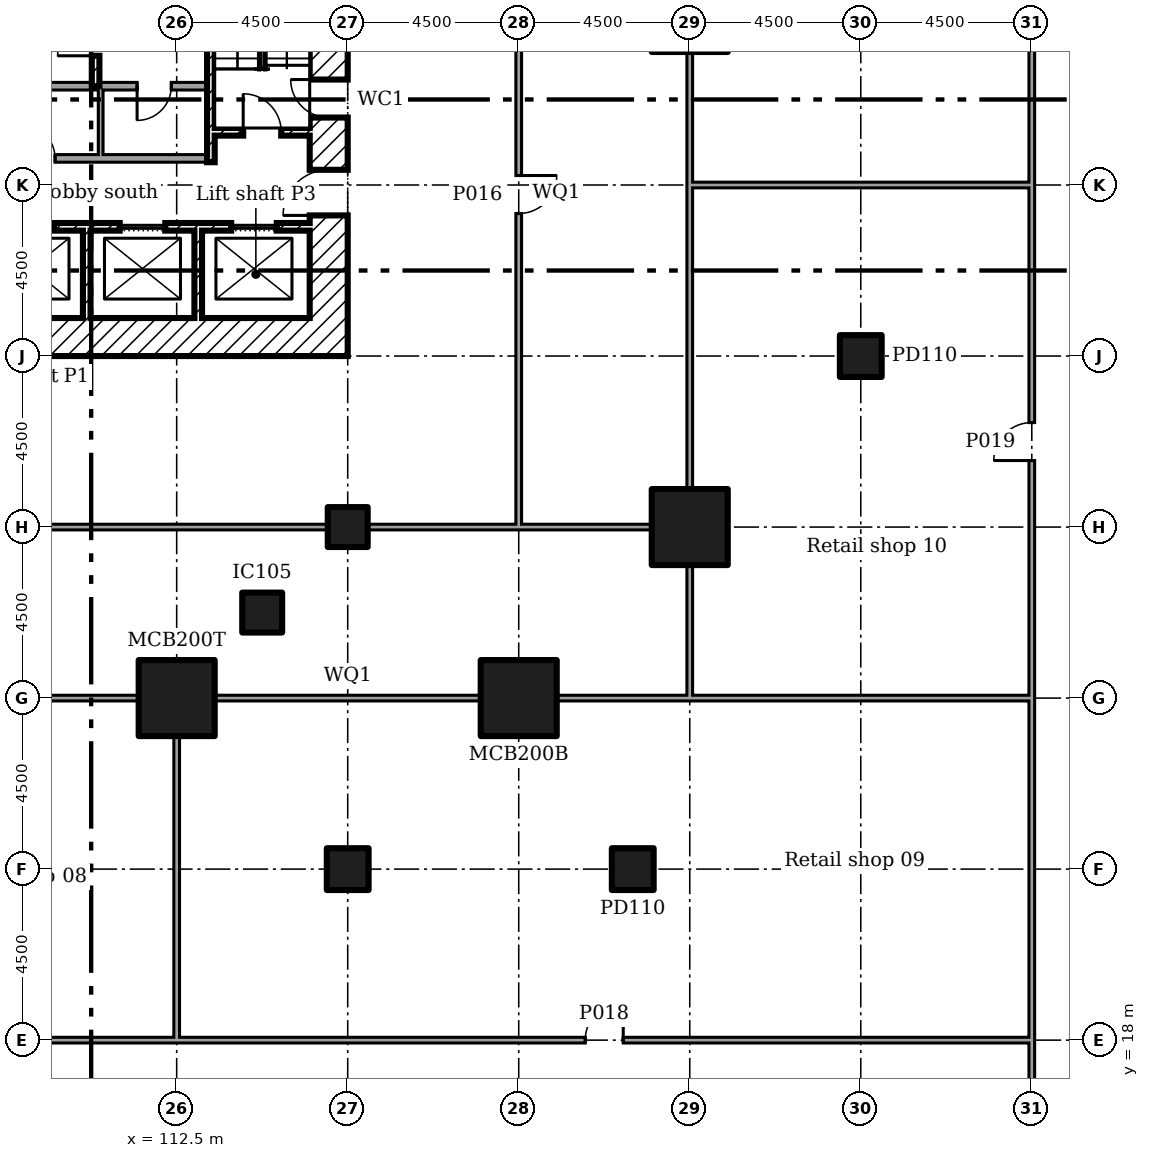
"""IFC4 building model, lengths in metres.
Left out: names, types, materials, properties, quantities, classifications, styles, units other than length and angle.
Written with IfcOpenShell. Run it as: python <this file> out.ifc"""

import sys

from ifc_helpers import new_model, si_unit, direction, frame, frame_2d, origin, origin_2d, place, context, subcontext, project, spatial, rectangle, extrude, element, fill, save


model = new_model("IFC4")
c1 = context("Model", 3, precision=1e-05, world=origin(), true_north=direction((0.0, 1.0)))
c2 = subcontext(c1, "Body", "Model", "MODEL_VIEW")
j1 = project(units=[si_unit("LENGTHUNIT", "METRE"), si_unit("PLANEANGLEUNIT", "RADIAN")], contexts=[c1])
p1 = place(None, origin())
s1 = spatial("IfcSite", under=j1, at=p1, CompositionType="ELEMENT")
p2 = place(p1, origin())
s2 = spatial("IfcBuilding", under=s1, at=p2, CompositionType="ELEMENT")
p3 = place(p2, frame((0.0, 0.0, 6.0)))
s3 = spatial("IfcBuildingStorey", under=s2, at=p3, CompositionType="ELEMENT", Elevation=6.0)
for number, where in (
    (1, (112.5, 27.0, 0.0)),
    (2, (121.5, 27.0, 0.0)),
    (3, (126.0, 31.5, 0.0)),
):
    element("IfcColumn", number, at=place(p3, frame(where)), inside=s3, PredefinedType="COLUMN", context=c2, shape_type="SweptSolid", body=[
        extrude(rectangle(XDim=2.0, YDim=2.0, at=origin_2d()), origin(), (0.0, 0.0, 1.0), 5.5),
    ])
for number, where in (
    (4, (114.75, 29.25, 0.0)),
    (5, (117.0, 31.5, 0.0)),
):
    element("IfcColumn", number, at=place(p3, frame(where)), inside=s3, PredefinedType="COLUMN", context=c2, shape_type="SweptSolid", body=[
        extrude(rectangle(XDim=1.05, YDim=1.05, at=origin_2d()), origin(), (0.0, 0.0, 1.0), 5.5),
    ])
for number, where in (
    (6, (117.0, 22.5, 0.0)),
    (7, (124.5, 22.5, 0.0)),
    (8, (130.5, 36.0, 0.0)),
):
    element("IfcColumn", number, at=place(p3, frame(where)), inside=s3, PredefinedType="COLUMN", context=c2, shape_type="SweptSolid", body=[
        extrude(rectangle(XDim=1.1, YDim=1.1, at=origin_2d()), origin(), (0.0, 0.0, 1.0), 5.5),
    ])
p4 = place(p3, frame((116.5, 36.0, 0.0), z_axis=(0.0, 0.0, 1.0), x_axis=(0.0, 1.0, 0.0)))
e9 = element("IfcWall", 9, at=p4, inside=s3, PredefinedType="SHEAR", context=c2, shape_type="SweptSolid", body=[
    extrude(rectangle(XDim=13.5, YDim=1.0, at=frame_2d((6.75, 0.0))), origin(), (0.0, 0.0, 1.0), 5.0),
])
p5 = place(p4, frame((3.7, 0.0, 0.0)))
e10 = element("IfcOpeningElement", 10, at=p5, cuts=e9, PredefinedType="OPENING", context=c2, shape_type="SweptSolid", body=[
    extrude(rectangle(XDim=1.2, YDim=2.1, at=frame_2d((0.6, 1.05))), frame((0.0, 0.51, 0.0), z_axis=(0.0, -1.0, 0.0), x_axis=(1.0, 0.0, 0.0)), (0.0, 0.0, 1.0), 1.02),
])
p6 = place(p4, frame((6.275, 0.0, 0.0)))
e11 = element("IfcOpeningElement", 11, at=p6, cuts=e9, PredefinedType="OPENING", context=c2, shape_type="SweptSolid", body=[
    extrude(rectangle(XDim=1.0, YDim=2.1, at=frame_2d((0.5, 1.05))), frame((0.0, 0.51, 0.0), z_axis=(0.0, -1.0, 0.0), x_axis=(1.0, 0.0, 0.0)), (0.0, 0.0, 1.0), 1.02),
])
p7 = place(p3, frame((104.5, 36.5, 0.0)))
e12 = element("IfcWall", 12, at=p7, inside=s3, PredefinedType="SHEAR", context=c2, shape_type="SweptSolid", body=[
    extrude(rectangle(XDim=11.5, YDim=1.0, at=frame_2d((5.75, 0.0))), origin(), (0.0, 0.0, 1.0), 5.0),
])
p8 = place(p3, frame((110.367, 48.5, 0.0), z_axis=(0.0, 0.0, 1.0), x_axis=(0.0, -1.0, 0.0)))
e13 = element("IfcWall", 13, at=p8, inside=s3, PredefinedType="SHEAR", context=c2, shape_type="SweptSolid", body=[
    extrude(rectangle(XDim=5.4, YDim=0.2, at=frame_2d((2.7, 0.0))), origin(), (0.0, 0.0, 1.0), 5.0),
])
p9 = place(p8, frame((3.6, 0.0, 0.0)))
e14 = element("IfcOpeningElement", 14, at=p9, cuts=e13, PredefinedType="OPENING", context=c2, shape_type="SweptSolid", body=[
    extrude(rectangle(XDim=1.0, YDim=2.1, at=frame_2d((0.5, 1.05))), frame((0.0, 0.11, 0.0), z_axis=(0.0, -1.0, 0.0), x_axis=(1.0, 0.0, 0.0)), (0.0, 0.0, 1.0), 0.22),
])
for number, where, z_axis, x_axis in (
    (15, (110.133, 37.0, 0.0), (0.0, 0.0, 1.0), (0.0, 1.0, 0.0)),
    (16, (113.067, 37.0, 0.0), (0.0, 0.0, 1.0), (0.0, 1.0, 0.0)),
):
    element("IfcWall", number, at=place(p3, frame(where, z_axis=z_axis, x_axis=x_axis)), inside=s3, PredefinedType="SHEAR", context=c2, shape_type="SweptSolid", body=[
        extrude(rectangle(XDim=2.3, YDim=0.2, at=frame_2d((1.15, 0.0))), origin(), (0.0, 0.0, 1.0), 5.0),
    ])
p10 = place(p3, frame((107.2, 39.4, 0.0)))
e17 = element("IfcWall", 17, at=p10, inside=s3, PredefinedType="SHEAR", context=c2, shape_type="SweptSolid", body=[
    extrude(rectangle(XDim=8.8, YDim=0.2, at=frame_2d((4.4, 0.0))), origin(), (0.0, 0.0, 1.0), 5.0),
])
p11 = place(p10, frame((0.867, 0.0, 0.0)))
e18 = element("IfcOpeningElement", 18, at=p11, cuts=e17, PredefinedType="OPENING", context=c2, shape_type="SweptSolid", body=[
    extrude(rectangle(XDim=1.2, YDim=2.1, at=frame_2d((0.6, 1.05))), frame((0.0, 0.11, 0.0), z_axis=(0.0, -1.0, 0.0), x_axis=(1.0, 0.0, 0.0)), (0.0, 0.0, 1.0), 0.22),
])
p12 = place(p10, frame((3.8, 0.0, 0.0)))
e19 = element("IfcOpeningElement", 19, at=p12, cuts=e17, PredefinedType="OPENING", context=c2, shape_type="SweptSolid", body=[
    extrude(rectangle(XDim=1.2, YDim=2.1, at=frame_2d((0.6, 1.05))), frame((0.0, 0.11, 0.0), z_axis=(0.0, -1.0, 0.0), x_axis=(1.0, 0.0, 0.0)), (0.0, 0.0, 1.0), 0.22),
])
p13 = place(p10, frame((6.733, 0.0, 0.0)))
e20 = element("IfcOpeningElement", 20, at=p13, cuts=e17, PredefinedType="OPENING", context=c2, shape_type="SweptSolid", body=[
    extrude(rectangle(XDim=1.2, YDim=2.1, at=frame_2d((0.6, 1.05))), frame((0.0, 0.11, 0.0), z_axis=(0.0, -1.0, 0.0), x_axis=(1.0, 0.0, 0.0)), (0.0, 0.0, 1.0), 0.22),
])
p14 = place(p3, frame((113.5, 41.9, 0.0)))
e21 = element("IfcWall", 21, at=p14, inside=s3, PredefinedType="SHEAR", context=c2, shape_type="SweptSolid", body=[
    extrude(rectangle(XDim=2.5, YDim=0.2, at=frame_2d((1.25, 0.0))), origin(), (0.0, 0.0, 1.0), 5.0),
])
p15 = place(p14, frame((0.75, 0.0, 0.0)))
e22 = element("IfcOpeningElement", 22, at=p15, cuts=e21, PredefinedType="OPENING", context=c2, shape_type="SweptSolid", body=[
    extrude(rectangle(XDim=1.0, YDim=2.1, at=frame_2d((0.5, 1.05))), frame((0.0, 0.11, 0.0), z_axis=(0.0, -1.0, 0.0), x_axis=(1.0, 0.0, 0.0)), (0.0, 0.0, 1.0), 0.22),
])
p16 = place(p3, frame((113.4, 41.1, 0.0), z_axis=(0.0, 0.0, 1.0), x_axis=(0.0, 1.0, 0.0)))
e23 = element("IfcWall", 23, at=p16, inside=s3, PredefinedType="SHEAR", context=c2, shape_type="SweptSolid", body=[
    extrude(rectangle(XDim=7.4, YDim=0.2, at=frame_2d((3.7, 0.0))), origin(), (0.0, 0.0, 1.0), 5.0),
])
p17 = place(p3, frame((107.2, 43.1, 0.0)))
e24 = element("IfcWall", 24, at=p17, inside=s3, PredefinedType="PARTITIONING", context=c2, shape_type="SweptSolid", body=[
    extrude(rectangle(XDim=6.1, YDim=0.2, at=frame_2d((3.05, 0.0))), origin(), (0.0, 0.0, 1.0), 5.0),
])
p18 = place(p17, frame((4.259, 0.0, 0.0)))
e25 = element("IfcOpeningElement", 25, at=p18, cuts=e24, PredefinedType="OPENING", context=c2, shape_type="SweptSolid", body=[
    extrude(rectangle(XDim=0.9, YDim=2.1, at=frame_2d((0.45, 1.05))), frame((0.0, 0.11, 0.0), z_axis=(0.0, -1.0, 0.0), x_axis=(1.0, 0.0, 0.0)), (0.0, 0.0, 1.0), 0.22),
])
p19 = place(p3, frame((107.2, 41.2, 0.0)))
e26 = element("IfcWall", 26, at=p19, inside=s3, PredefinedType="PARTITIONING", context=c2, shape_type="SweptSolid", body=[
    extrude(rectangle(XDim=6.1, YDim=0.2, at=frame_2d((3.05, 0.0))), origin(), (0.0, 0.0, 1.0), 5.0),
])
p20 = place(p19, frame((1.2, 0.0, 0.0)))
e27 = element("IfcOpeningElement", 27, at=p20, cuts=e26, PredefinedType="OPENING", context=c2, shape_type="SweptSolid", body=[
    extrude(rectangle(XDim=0.9, YDim=2.1, at=frame_2d((0.45, 1.05))), frame((0.0, 0.11, 0.0), z_axis=(0.0, -1.0, 0.0), x_axis=(1.0, 0.0, 0.0)), (0.0, 0.0, 1.0), 0.22),
])
p21 = place(p3, frame((110.5, 41.3, 0.0), z_axis=(0.0, 0.0, 1.0), x_axis=(0.0, 1.0, 0.0)))
e28 = element("IfcWall", 28, at=p21, inside=s3, PredefinedType="PARTITIONING", context=c2, shape_type="SweptSolid", body=[
    extrude(rectangle(XDim=1.7, YDim=0.125, at=frame_2d((0.85, 0.0))), origin(), (0.0, 0.0, 1.0), 5.0),
])
p22 = place(p3, frame((135.0, 9.3, 0.0), z_axis=(0.0, 0.0, 1.0), x_axis=(0.0, 1.0, 0.0)))
e29 = element("IfcWall", 29, at=p22, inside=s3, PredefinedType="PARTITIONING", context=c2, shape_type="SweptSolid", body=[
    extrude(rectangle(XDim=8.775, YDim=0.15, at=frame_2d((4.387, 0.0))), origin(), (0.0, 0.0, 1.0), 5.05),
])
p23 = place(p22, frame((3.45, 0.0, 0.0)))
e30 = element("IfcOpeningElement", 30, at=p23, cuts=e29, PredefinedType="OPENING", context=c2, shape_type="SweptSolid", body=[
    extrude(rectangle(XDim=1.8, YDim=2.1, at=frame_2d((0.9, 1.05))), frame((0.0, 0.085, 0.0), z_axis=(0.0, -1.0, 0.0), x_axis=(1.0, 0.0, 0.0)), (0.0, 0.0, 1.0), 0.17),
])
p24 = place(p3, frame((94.575, 18.0, 0.0)))
e31 = element("IfcWall", 31, at=p24, inside=s3, PredefinedType="PARTITIONING", context=c2, shape_type="SweptSolid", body=[
    extrude(rectangle(XDim=18.0, YDim=0.15, at=frame_2d((9.0, 0.0))), origin(), (0.0, 0.0, 1.0), 5.05),
])
p25 = place(p24, frame((8.425, 0.0, 0.0)))
e32 = element("IfcOpeningElement", 32, at=p25, cuts=e31, PredefinedType="OPENING", context=c2, shape_type="SweptSolid", body=[
    extrude(rectangle(XDim=1.0, YDim=2.1, at=frame_2d((0.5, 1.05))), frame((0.0, 0.085, 0.0), z_axis=(0.0, -1.0, 0.0), x_axis=(1.0, 0.0, 0.0)), (0.0, 0.0, 1.0), 0.17),
])
p26 = place(p3, frame((112.5, 18.0, 0.0)))
e33 = element("IfcWall", 33, at=p26, inside=s3, PredefinedType="PARTITIONING", context=c2, shape_type="SweptSolid", body=[
    extrude(rectangle(XDim=22.425, YDim=0.15, at=frame_2d((11.212, 0.0))), origin(), (0.0, 0.0, 1.0), 5.05),
])
p27 = place(p26, frame((10.75, 0.0, 0.0)))
e34 = element("IfcOpeningElement", 34, at=p27, cuts=e33, PredefinedType="OPENING", context=c2, shape_type="SweptSolid", body=[
    extrude(rectangle(XDim=1.0, YDim=2.1, at=frame_2d((0.5, 1.05))), frame((0.0, 0.085, 0.0), z_axis=(0.0, -1.0, 0.0), x_axis=(1.0, 0.0, 0.0)), (0.0, 0.0, 1.0), 0.17),
])
p28 = place(p3, frame((135.0, 18.0, 0.0), z_axis=(0.0, 0.0, 1.0), x_axis=(0.0, 1.0, 0.0)))
e35 = element("IfcWall", 35, at=p28, inside=s3, PredefinedType="PARTITIONING", context=c2, shape_type="SweptSolid", body=[
    extrude(rectangle(XDim=9.075, YDim=0.15, at=frame_2d((4.538, 0.0))), origin(), (0.0, 0.0, 1.0), 5.05),
])
p29 = place(p3, frame((135.0, 27.0, 0.0), z_axis=(0.0, 0.0, 1.0), x_axis=(0.0, 1.0, 0.0)))
e36 = element("IfcWall", 36, at=p29, inside=s3, PredefinedType="PARTITIONING", context=c2, shape_type="SweptSolid", body=[
    extrude(rectangle(XDim=13.575, YDim=0.15, at=frame_2d((6.788, 0.0))), origin(), (0.0, 0.0, 1.0), 5.05),
])
p30 = place(p29, frame((6.25, 0.0, 0.0)))
e37 = element("IfcOpeningElement", 37, at=p30, cuts=e36, PredefinedType="OPENING", context=c2, shape_type="SweptSolid", body=[
    extrude(rectangle(XDim=1.0, YDim=2.1, at=frame_2d((0.5, 1.05))), frame((0.0, 0.085, 0.0), z_axis=(0.0, -1.0, 0.0), x_axis=(1.0, 0.0, 0.0)), (0.0, 0.0, 1.0), 0.17),
])
p31 = place(p3, frame((135.0, 40.5, 0.0), z_axis=(0.0, 0.0, 1.0), x_axis=(0.0, 1.0, 0.0)))
e38 = element("IfcWall", 38, at=p31, inside=s3, PredefinedType="PARTITIONING", context=c2, shape_type="SweptSolid", body=[
    extrude(rectangle(XDim=18.075, YDim=0.15, at=frame_2d((9.038, 0.0))), origin(), (0.0, 0.0, 1.0), 5.05),
])
p32 = place(p31, frame((7.3, 0.0, 0.0)))
e39 = element("IfcOpeningElement", 39, at=p32, cuts=e38, PredefinedType="OPENING", context=c2, shape_type="SweptSolid", body=[
    extrude(rectangle(XDim=1.0, YDim=2.1, at=frame_2d((0.5, 1.05))), frame((0.0, 0.085, 0.0), z_axis=(0.0, -1.0, 0.0), x_axis=(1.0, 0.0, 0.0)), (0.0, 0.0, 1.0), 0.17),
])
p33 = place(p3, frame((99.075, 31.5, 0.0)))
e40 = element("IfcWall", 40, at=p33, inside=s3, PredefinedType="PARTITIONING", context=c2, shape_type="SweptSolid", body=[
    extrude(rectangle(XDim=17.405, YDim=0.15, at=frame_2d((8.703, 0.0))), origin(), (0.0, 0.0, 1.0), 5.05),
])
p34 = place(p33, frame((8.175, 0.0, 0.0)))
e41 = element("IfcOpeningElement", 41, at=p34, cuts=e40, PredefinedType="OPENING", context=c2, shape_type="SweptSolid", body=[
    extrude(rectangle(XDim=1.0, YDim=2.1, at=frame_2d((0.5, 1.05))), frame((0.0, 0.085, 0.0), z_axis=(0.0, -1.0, 0.0), x_axis=(1.0, 0.0, 0.0)), (0.0, 0.0, 1.0), 0.17),
])
p35 = place(p3, frame((117.52, 31.5, 0.0)))
e42 = element("IfcWall", 42, at=p35, inside=s3, PredefinedType="PARTITIONING", context=c2, shape_type="SweptSolid", body=[
    extrude(rectangle(XDim=4.055, YDim=0.15, at=frame_2d((2.027, 0.0))), origin(), (0.0, 0.0, 1.0), 5.05),
])
p36 = place(p3, frame((121.5, 31.575, 0.0), z_axis=(0.0, 0.0, 1.0), x_axis=(0.0, 1.0, 0.0)))
e43 = element("IfcWall", 43, at=p36, inside=s3, PredefinedType="PARTITIONING", context=c2, shape_type="SweptSolid", body=[
    extrude(rectangle(XDim=17.405, YDim=0.15, at=frame_2d((8.703, 0.0))), origin(), (0.0, 0.0, 1.0), 5.05),
])
p37 = place(p36, frame((8.175, 0.0, 0.0)))
e44 = element("IfcOpeningElement", 44, at=p37, cuts=e43, PredefinedType="OPENING", context=c2, shape_type="SweptSolid", body=[
    extrude(rectangle(XDim=1.0, YDim=2.1, at=frame_2d((0.5, 1.05))), frame((0.0, 0.085, 0.0), z_axis=(0.0, -1.0, 0.0), x_axis=(1.0, 0.0, 0.0)), (0.0, 0.0, 1.0), 0.17),
])
p38 = place(p3, frame((121.5, 31.5, 0.0)))
e45 = element("IfcWall", 45, at=p38, inside=s3, PredefinedType="PARTITIONING", context=c2, shape_type="SweptSolid", body=[
    extrude(rectangle(XDim=3.505, YDim=0.15, at=frame_2d((1.752, 0.0))), origin(), (0.0, 0.0, 1.0), 5.05),
])
p39 = place(p3, frame((99.995, 27.0, 0.0)))
e46 = element("IfcWall", 46, at=p39, inside=s3, PredefinedType="PARTITIONING", context=c2, shape_type="SweptSolid", body=[
    extrude(rectangle(XDim=11.51, YDim=0.15, at=frame_2d((5.755, 0.0))), origin(), (0.0, 0.0, 1.0), 5.05),
])
p40 = place(p3, frame((113.495, 27.0, 0.0)))
e47 = element("IfcWall", 47, at=p40, inside=s3, PredefinedType="PARTITIONING", context=c2, shape_type="SweptSolid", body=[
    extrude(rectangle(XDim=7.01, YDim=0.15, at=frame_2d((3.505, 0.0))), origin(), (0.0, 0.0, 1.0), 5.05),
])
p41 = place(p3, frame((122.495, 27.0, 0.0)))
e48 = element("IfcWall", 48, at=p41, inside=s3, PredefinedType="PARTITIONING", context=c2, shape_type="SweptSolid", body=[
    extrude(rectangle(XDim=3.58, YDim=0.15, at=frame_2d((1.79, 0.0))), origin(), (0.0, 0.0, 1.0), 5.05),
])
p42 = place(p3, frame((126.0, 27.075, 0.0), z_axis=(0.0, 0.0, 1.0), x_axis=(0.0, 1.0, 0.0)))
e49 = element("IfcWall", 49, at=p42, inside=s3, PredefinedType="PARTITIONING", context=c2, shape_type="SweptSolid", body=[
    extrude(rectangle(XDim=3.43, YDim=0.15, at=frame_2d((1.715, 0.0))), origin(), (0.0, 0.0, 1.0), 5.05),
])
p43 = place(p3, frame((126.0, 32.495, 0.0), z_axis=(0.0, 0.0, 1.0), x_axis=(0.0, 1.0, 0.0)))
e50 = element("IfcWall", 50, at=p43, inside=s3, PredefinedType="PARTITIONING", context=c2, shape_type="SweptSolid", body=[
    extrude(rectangle(XDim=8.08, YDim=0.15, at=frame_2d((4.04, 0.0))), origin(), (0.0, 0.0, 1.0), 5.05),
])
p44 = place(p3, frame((126.0, 40.5, 0.0), z_axis=(0.0, 0.0, 1.0), x_axis=(0.0, 1.0, 0.0)))
e51 = element("IfcWall", 51, at=p44, inside=s3, PredefinedType="PARTITIONING", context=c2, shape_type="SweptSolid", body=[
    extrude(rectangle(XDim=3.505, YDim=0.15, at=frame_2d((1.752, 0.0))), origin(), (0.0, 0.0, 1.0), 5.05),
])
p45 = place(p3, frame((112.5, 18.075, 0.0), z_axis=(0.0, 0.0, 1.0), x_axis=(0.0, 1.0, 0.0)))
e52 = element("IfcWall", 52, at=p45, inside=s3, PredefinedType="PARTITIONING", context=c2, shape_type="SweptSolid", body=[
    extrude(rectangle(XDim=7.93, YDim=0.15, at=frame_2d((3.965, 0.0))), origin(), (0.0, 0.0, 1.0), 5.05),
])
p46 = place(p3, frame((126.0, 27.0, 0.0)))
e53 = element("IfcWall", 53, at=p46, inside=s3, PredefinedType="PARTITIONING", context=c2, shape_type="SweptSolid", body=[
    extrude(rectangle(XDim=8.925, YDim=0.15, at=frame_2d((4.462, 0.0))), origin(), (0.0, 0.0, 1.0), 5.05),
])
p47 = place(p3, frame((126.075, 40.5, 0.0)))
e54 = element("IfcWall", 54, at=p47, inside=s3, PredefinedType="PARTITIONING", context=c2, shape_type="SweptSolid", body=[
    extrude(rectangle(XDim=8.85, YDim=0.15, at=frame_2d((4.425, 0.0))), origin(), (0.0, 0.0, 1.0), 5.05),
])
p48 = place(p5, origin())
e55 = element("IfcDoor", 55, at=p48, inside=s3, OperationType="SINGLE_SWING_RIGHT", PredefinedType="DOOR", context=c2, shape_type="SweptSolid", body=[
    extrude(rectangle(XDim=1.2, YDim=2.1, at=frame_2d((0.6, 1.05))), frame((0.0, 0.025, 0.0), z_axis=(0.0, -1.0, 0.0), x_axis=(1.0, 0.0, 0.0)), (0.0, 0.0, 1.0), 0.05),
])
fill(e10, e55)
p49 = place(p15, origin())
e56 = element("IfcDoor", 56, at=p49, inside=s3, OperationType="SINGLE_SWING_RIGHT", PredefinedType="DOOR", context=c2, shape_type="SweptSolid", body=[
    extrude(rectangle(XDim=1.0, YDim=2.1, at=frame_2d((0.5, 1.05))), frame((0.0, 0.025, 0.0), z_axis=(0.0, -1.0, 0.0), x_axis=(1.0, 0.0, 0.0)), (0.0, 0.0, 1.0), 0.05),
])
fill(e22, e56)
p50 = place(p6, origin())
e57 = element("IfcDoor", 57, at=p50, inside=s3, OperationType="SINGLE_SWING_LEFT", PredefinedType="DOOR", context=c2, shape_type="SweptSolid", body=[
    extrude(rectangle(XDim=1.0, YDim=2.1, at=frame_2d((0.5, 1.05))), frame((0.0, 0.025, 0.0), z_axis=(0.0, -1.0, 0.0), x_axis=(1.0, 0.0, 0.0)), (0.0, 0.0, 1.0), 0.05),
])
fill(e11, e57)
p51 = place(p9, frame((1.0, 0.0, 0.0), x_axis=(-1.0, 0.0, 0.0)))
e58 = element("IfcDoor", 58, at=p51, inside=s3, OperationType="SINGLE_SWING_RIGHT", PredefinedType="DOOR", context=c2, shape_type="SweptSolid", body=[
    extrude(rectangle(XDim=1.0, YDim=2.1, at=frame_2d((0.5, 1.05))), frame((0.0, 0.025, 0.0), z_axis=(0.0, -1.0, 0.0), x_axis=(1.0, 0.0, 0.0)), (0.0, 0.0, 1.0), 0.05),
])
fill(e14, e58)
p52 = place(p20, origin())
e59 = element("IfcDoor", 59, at=p52, inside=s3, OperationType="SINGLE_SWING_RIGHT", PredefinedType="DOOR", context=c2, shape_type="SweptSolid", body=[
    extrude(rectangle(XDim=0.9, YDim=2.1, at=frame_2d((0.45, 1.05))), frame((0.0, 0.025, 0.0), z_axis=(0.0, -1.0, 0.0), x_axis=(1.0, 0.0, 0.0)), (0.0, 0.0, 1.0), 0.05),
])
fill(e27, e59)
p53 = place(p18, frame((0.9, 0.0, 0.0), x_axis=(-1.0, 0.0, 0.0)))
e60 = element("IfcDoor", 60, at=p53, inside=s3, OperationType="SINGLE_SWING_LEFT", PredefinedType="DOOR", context=c2, shape_type="SweptSolid", body=[
    extrude(rectangle(XDim=0.9, YDim=2.1, at=frame_2d((0.45, 1.05))), frame((0.0, 0.025, 0.0), z_axis=(0.0, -1.0, 0.0), x_axis=(1.0, 0.0, 0.0)), (0.0, 0.0, 1.0), 0.05),
])
fill(e25, e60)
p54 = place(p11, origin())
e61 = element("IfcDoor", 61, at=p54, inside=s3, OperationType="SLIDING_TO_LEFT", PredefinedType="DOOR", context=c2, shape_type="SweptSolid", body=[
    extrude(rectangle(XDim=1.2, YDim=2.1, at=frame_2d((0.6, 1.05))), frame((0.0, 0.025, 0.0), z_axis=(0.0, -1.0, 0.0), x_axis=(1.0, 0.0, 0.0)), (0.0, 0.0, 1.0), 0.05),
])
fill(e18, e61)
p55 = place(p12, origin())
e62 = element("IfcDoor", 62, at=p55, inside=s3, OperationType="SLIDING_TO_LEFT", PredefinedType="DOOR", context=c2, shape_type="SweptSolid", body=[
    extrude(rectangle(XDim=1.2, YDim=2.1, at=frame_2d((0.6, 1.05))), frame((0.0, 0.025, 0.0), z_axis=(0.0, -1.0, 0.0), x_axis=(1.0, 0.0, 0.0)), (0.0, 0.0, 1.0), 0.05),
])
fill(e19, e62)
p56 = place(p13, origin())
e63 = element("IfcDoor", 63, at=p56, inside=s3, OperationType="SLIDING_TO_LEFT", PredefinedType="DOOR", context=c2, shape_type="SweptSolid", body=[
    extrude(rectangle(XDim=1.2, YDim=2.1, at=frame_2d((0.6, 1.05))), frame((0.0, 0.025, 0.0), z_axis=(0.0, -1.0, 0.0), x_axis=(1.0, 0.0, 0.0)), (0.0, 0.0, 1.0), 0.05),
])
fill(e20, e63)
p57 = place(p37, frame((1.0, 0.0, 0.0), x_axis=(-1.0, 0.0, 0.0)))
e64 = element("IfcDoor", 64, at=p57, inside=s3, OperationType="SINGLE_SWING_RIGHT", PredefinedType="DOOR", context=c2, shape_type="SweptSolid", body=[
    extrude(rectangle(XDim=1.0, YDim=2.1, at=frame_2d((0.5, 1.05))), frame((0.0, 0.025, 0.0), z_axis=(0.0, -1.0, 0.0), x_axis=(1.0, 0.0, 0.0)), (0.0, 0.0, 1.0), 0.05),
])
fill(e44, e64)
p58 = place(p27, origin())
e65 = element("IfcDoor", 65, at=p58, inside=s3, OperationType="SINGLE_SWING_LEFT", PredefinedType="DOOR", context=c2, shape_type="SweptSolid", body=[
    extrude(rectangle(XDim=1.0, YDim=2.1, at=frame_2d((0.5, 1.05))), frame((0.0, 0.025, 0.0), z_axis=(0.0, -1.0, 0.0), x_axis=(1.0, 0.0, 0.0)), (0.0, 0.0, 1.0), 0.05),
])
fill(e34, e65)
p59 = place(p30, origin())
e66 = element("IfcDoor", 66, at=p59, inside=s3, OperationType="SINGLE_SWING_RIGHT", PredefinedType="DOOR", context=c2, shape_type="SweptSolid", body=[
    extrude(rectangle(XDim=1.0, YDim=2.1, at=frame_2d((0.5, 1.05))), frame((0.0, 0.025, 0.0), z_axis=(0.0, -1.0, 0.0), x_axis=(1.0, 0.0, 0.0)), (0.0, 0.0, 1.0), 0.05),
])
fill(e37, e66)
save(model, sys.argv[1])
